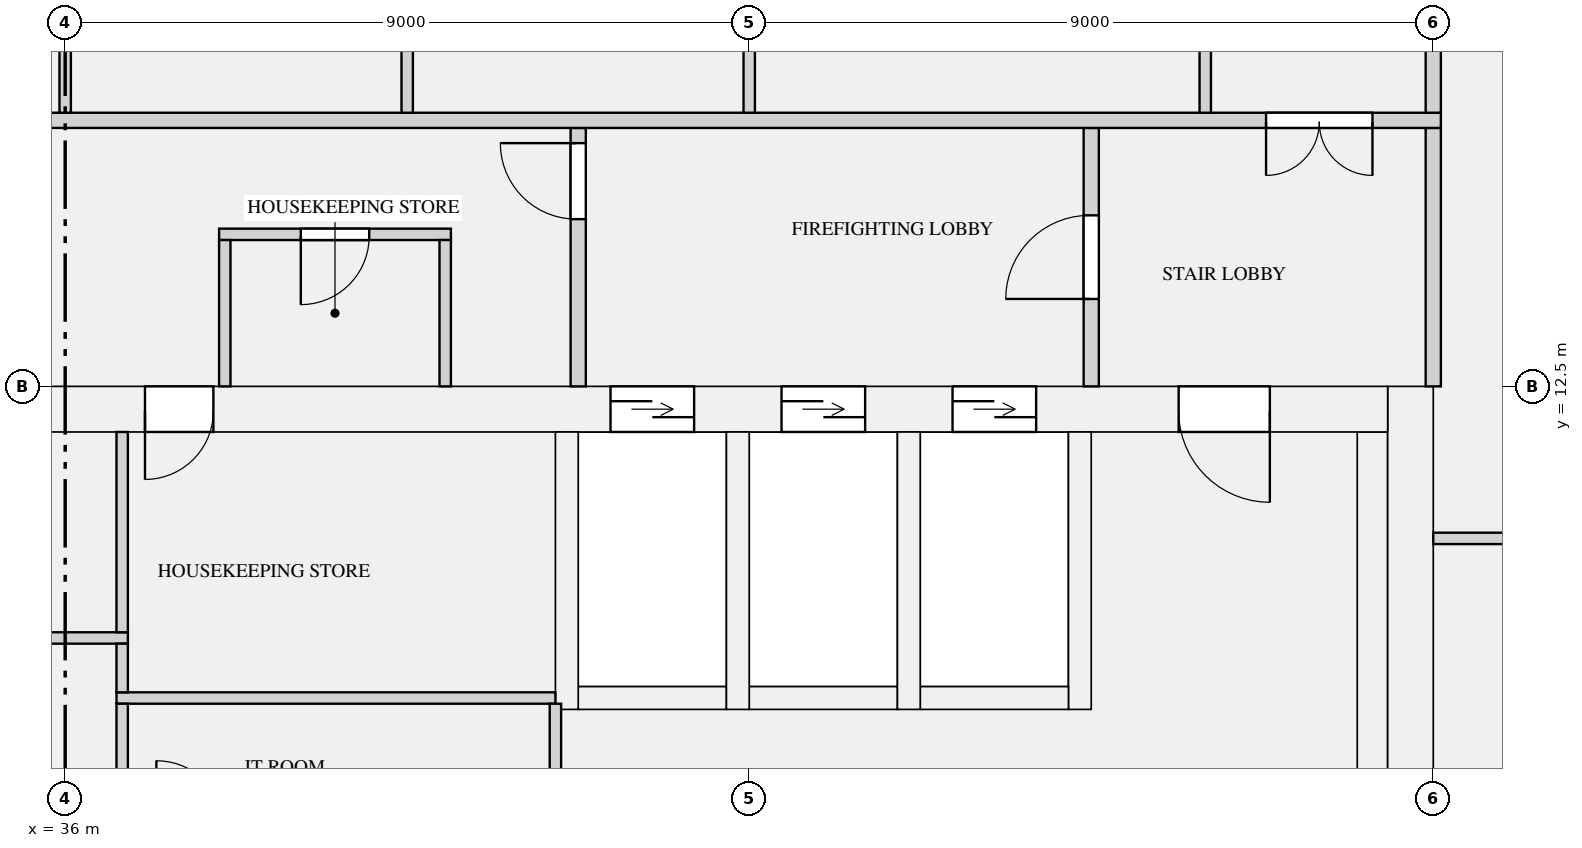
"""IFC4 building model, lengths in metres.
Left out: names, types, materials, properties, quantities, classifications, styles, units other than length and angle.
Written with IfcOpenShell. Run it as: python <this file> out.ifc"""

import sys

from ifc_helpers import new_model, si_unit, direction, frame, frame_2d, origin, place, context, subcontext, project, spatial, rectangle, extrude, element, fill, save


model = new_model("IFC4")
c1 = context("Model", 3, precision=1e-05, world=origin(), true_north=direction((0.0, 1.0)))
c2 = subcontext(c1, "Body", "Model", "MODEL_VIEW")
j1 = project(units=[si_unit("LENGTHUNIT", "METRE"), si_unit("PLANEANGLEUNIT", "RADIAN")], contexts=[c1])
p1 = place(None, origin())
s1 = spatial("IfcSite", under=j1, at=p1, CompositionType="ELEMENT")
p2 = place(p1, origin())
s2 = spatial("IfcBuilding", under=s1, at=p2, CompositionType="ELEMENT")
p3 = place(p2, frame((0.0, 0.0, 223.2)))
s3 = spatial("IfcBuildingStorey", under=s2, at=p3, CompositionType="ELEMENT", Elevation=223.2)
p4 = place(p3, frame((53.7, 0.0, 0.0), z_axis=(0.0, 0.0, 1.0), x_axis=(0.0, 1.0, 0.0)))
e1 = element("IfcWall", 1, at=p4, inside=s3, PredefinedType="SHEAR", context=c2, shape_type="SweptSolid", body=[
    extrude(rectangle(XDim=12.5, YDim=0.6, at=frame_2d((6.25, 0.0))), origin(), (0.0, 0.0, 1.0), 3.15),
])
p5 = place(p3, frame((18.6, 12.2, 0.0), z_axis=(0.0, 0.0, 1.0), x_axis=(1.0, 0.0, 0.0)))
e2 = element("IfcWall", 2, at=p5, inside=s3, PredefinedType="SHEAR", context=c2, shape_type="SweptSolid", body=[
    extrude(rectangle(XDim=34.8, YDim=0.6, at=frame_2d((17.4, 0.0))), origin(), (0.0, 0.0, 1.0), 3.15),
])
p6 = place(p5, frame((24.575, 0.0, 0.0)))
e3 = element("IfcOpeningElement", 3, at=p6, cuts=e2, PredefinedType="OPENING", context=c2, shape_type="SweptSolid", body=[
    extrude(rectangle(XDim=1.1, YDim=2.1, at=frame_2d((0.55, 1.05))), frame((0.0, 0.31, 0.0), z_axis=(0.0, -1.0, 0.0), x_axis=(1.0, 0.0, 0.0)), (0.0, 0.0, 1.0), 0.62),
])
p7 = place(p5, frame((26.825, 0.0, 0.0)))
e4 = element("IfcOpeningElement", 4, at=p7, cuts=e2, PredefinedType="OPENING", context=c2, shape_type="SweptSolid", body=[
    extrude(rectangle(XDim=1.1, YDim=2.1, at=frame_2d((0.55, 1.05))), frame((0.0, 0.31, 0.0), z_axis=(0.0, -1.0, 0.0), x_axis=(1.0, 0.0, 0.0)), (0.0, 0.0, 1.0), 0.62),
])
p8 = place(p5, frame((29.075, 0.0, 0.0)))
e5 = element("IfcOpeningElement", 5, at=p8, cuts=e2, PredefinedType="OPENING", context=c2, shape_type="SweptSolid", body=[
    extrude(rectangle(XDim=1.1, YDim=2.1, at=frame_2d((0.55, 1.05))), frame((0.0, 0.31, 0.0), z_axis=(0.0, -1.0, 0.0), x_axis=(1.0, 0.0, 0.0)), (0.0, 0.0, 1.0), 0.62),
])
p9 = place(p5, frame((11.95, 0.0, 0.0)))
e6 = element("IfcOpeningElement", 6, at=p9, cuts=e2, PredefinedType="OPENING", context=c2, shape_type="SweptSolid", body=[
    extrude(rectangle(XDim=0.9, YDim=2.1, at=frame_2d((0.45, 1.05))), frame((0.0, 0.31, 0.0), z_axis=(0.0, -1.0, 0.0), x_axis=(1.0, 0.0, 0.0)), (0.0, 0.0, 1.0), 0.62),
])
p10 = place(p5, frame((18.45, 0.0, 0.0)))
e7 = element("IfcOpeningElement", 7, at=p10, cuts=e2, PredefinedType="OPENING", context=c2, shape_type="SweptSolid", body=[
    extrude(rectangle(XDim=0.9, YDim=2.1, at=frame_2d((0.45, 1.05))), frame((0.0, 0.31, 0.0), z_axis=(0.0, -1.0, 0.0), x_axis=(1.0, 0.0, 0.0)), (0.0, 0.0, 1.0), 0.62),
])
p11 = place(p5, frame((1.55, 0.0, 0.0)))
e8 = element("IfcOpeningElement", 8, at=p11, cuts=e2, PredefinedType="OPENING", context=c2, shape_type="SweptSolid", body=[
    extrude(rectangle(XDim=1.2, YDim=2.1, at=frame_2d((0.6, 1.05))), frame((0.0, 0.31, 0.0), z_axis=(0.0, -1.0, 0.0), x_axis=(1.0, 0.0, 0.0)), (0.0, 0.0, 1.0), 0.62),
])
p12 = place(p5, frame((32.05, 0.0, 0.0)))
e9 = element("IfcOpeningElement", 9, at=p12, cuts=e2, PredefinedType="OPENING", context=c2, shape_type="SweptSolid", body=[
    extrude(rectangle(XDim=1.2, YDim=2.1, at=frame_2d((0.6, 1.05))), frame((0.0, 0.31, 0.0), z_axis=(0.0, -1.0, 0.0), x_axis=(1.0, 0.0, 0.0)), (0.0, 0.0, 1.0), 0.62),
])
p13 = place(p3, frame((53.2, 1.0, 0.0), z_axis=(0.0, 0.0, 1.0), x_axis=(0.0, 1.0, 0.0)))
e10 = element("IfcWall", 10, at=p13, inside=s3, PredefinedType="SHEAR", context=c2, shape_type="SweptSolid", body=[
    extrude(rectangle(XDim=10.9, YDim=0.4, at=frame_2d((5.45, 0.0))), origin(), (0.0, 0.0, 1.0), 3.15),
])
p14 = place(p3, frame((42.75, 8.4, 0.0), z_axis=(0.0, 0.0, 1.0), x_axis=(1.0, 0.0, 0.0)))
e11 = element("IfcWall", 11, at=p14, inside=s3, PredefinedType="SHEAR", context=c2, shape_type="SweptSolid", body=[
    extrude(rectangle(XDim=1.95, YDim=0.3, at=frame_2d((0.975, 0.0))), origin(), (0.0, 0.0, 1.0), 3.15),
])
p15 = place(p3, frame((42.6, 8.25, 0.0), z_axis=(0.0, 0.0, 1.0), x_axis=(0.0, 1.0, 0.0)))
e12 = element("IfcWall", 12, at=p15, inside=s3, PredefinedType="SHEAR", context=c2, shape_type="SweptSolid", body=[
    extrude(rectangle(XDim=3.65, YDim=0.3, at=frame_2d((1.825, 0.0))), origin(), (0.0, 0.0, 1.0), 3.15),
])
p16 = place(p3, frame((45.0, 8.4, 0.0), z_axis=(0.0, 0.0, 1.0), x_axis=(1.0, 0.0, 0.0)))
e13 = element("IfcWall", 13, at=p16, inside=s3, PredefinedType="SHEAR", context=c2, shape_type="SweptSolid", body=[
    extrude(rectangle(XDim=1.95, YDim=0.3, at=frame_2d((0.975, 0.0))), origin(), (0.0, 0.0, 1.0), 3.15),
])
p17 = place(p3, frame((44.85, 8.25, 0.0), z_axis=(0.0, 0.0, 1.0), x_axis=(0.0, 1.0, 0.0)))
e14 = element("IfcWall", 14, at=p17, inside=s3, PredefinedType="SHEAR", context=c2, shape_type="SweptSolid", body=[
    extrude(rectangle(XDim=3.65, YDim=0.3, at=frame_2d((1.825, 0.0))), origin(), (0.0, 0.0, 1.0), 3.15),
])
p18 = place(p3, frame((47.25, 8.4, 0.0), z_axis=(0.0, 0.0, 1.0), x_axis=(1.0, 0.0, 0.0)))
e15 = element("IfcWall", 15, at=p18, inside=s3, PredefinedType="SHEAR", context=c2, shape_type="SweptSolid", body=[
    extrude(rectangle(XDim=1.95, YDim=0.3, at=frame_2d((0.975, 0.0))), origin(), (0.0, 0.0, 1.0), 3.15),
])
for number, where, z_axis, x_axis in (
    (16, (47.1, 8.25, 0.0), (0.0, 0.0, 1.0), (0.0, 1.0, 0.0)),
    (17, (49.35, 8.25, 0.0), (0.0, 0.0, 1.0), (0.0, 1.0, 0.0)),
):
    element("IfcWall", number, at=place(p3, frame(where, z_axis=z_axis, x_axis=x_axis)), inside=s3, PredefinedType="SHEAR", context=c2, shape_type="SweptSolid", body=[
        extrude(rectangle(XDim=3.65, YDim=0.3, at=frame_2d((1.825, 0.0))), origin(), (0.0, 0.0, 1.0), 3.15),
    ])
p19 = place(p3, frame((36.675, 8.4, 0.0), z_axis=(0.0, 0.0, 1.0), x_axis=(1.0, 0.0, 0.0)))
e18 = element("IfcWall", 18, at=p19, inside=s3, PredefinedType="PARTITIONING", context=c2, shape_type="SweptSolid", body=[
    extrude(rectangle(XDim=5.775, YDim=0.15, at=frame_2d((2.887, 0.0))), origin(), (0.0, 0.0, 1.0), 2.83),
])
p20 = place(p3, frame((28.275, 9.19, 0.0), z_axis=(0.0, 0.0, 1.0), x_axis=(1.0, 0.0, 0.0)))
e19 = element("IfcWall", 19, at=p20, inside=s3, PredefinedType="PARTITIONING", context=c2, shape_type="SweptSolid", body=[
    extrude(rectangle(XDim=8.55, YDim=0.15, at=frame_2d((4.275, 0.0))), origin(), (0.0, 0.0, 1.0), 2.83),
])
p21 = place(p3, frame((38.025, 14.5, 0.0), z_axis=(0.0, 0.0, 1.0), x_axis=(1.0, 0.0, 0.0)))
e20 = element("IfcWall", 20, at=p21, inside=s3, PredefinedType="PARTITIONING", context=c2, shape_type="SweptSolid", body=[
    extrude(rectangle(XDim=3.05, YDim=0.15, at=frame_2d((1.525, 0.0))), origin(), (0.0, 0.0, 1.0), 2.83),
])
p22 = place(p21, frame((1.075, 0.0, 0.0)))
e21 = element("IfcOpeningElement", 21, at=p22, cuts=e20, PredefinedType="OPENING", context=c2, shape_type="SweptSolid", body=[
    extrude(rectangle(XDim=0.9, YDim=2.1, at=frame_2d((0.45, 1.05))), frame((0.0, 0.085, 0.0), z_axis=(0.0, -1.0, 0.0), x_axis=(1.0, 0.0, 0.0)), (0.0, 0.0, 1.0), 0.17),
])
p23 = place(p3, frame((42.45, 6.65, 0.0), z_axis=(0.0, 0.0, 1.0), x_axis=(0.0, 1.0, 0.0)))
e22 = element("IfcWall", 22, at=p23, inside=s3, PredefinedType="PARTITIONING", context=c2, shape_type="SweptSolid", body=[
    extrude(rectangle(XDim=1.675, YDim=0.15, at=frame_2d((0.837, 0.0))), origin(), (0.0, 0.0, 1.0), 2.83),
])
p24 = place(p3, frame((36.75, 6.725, 0.0), z_axis=(0.0, 0.0, 1.0), x_axis=(0.0, 1.0, 0.0)))
e23 = element("IfcWall", 23, at=p24, inside=s3, PredefinedType="PARTITIONING", context=c2, shape_type="SweptSolid", body=[
    extrude(rectangle(XDim=1.6, YDim=0.15, at=frame_2d((0.8, 0.0))), origin(), (0.0, 0.0, 1.0), 2.83),
])
p25 = place(p3, frame((36.75, 8.475, 0.0), z_axis=(0.0, 0.0, 1.0), x_axis=(0.0, 1.0, 0.0)))
e24 = element("IfcWall", 24, at=p25, inside=s3, PredefinedType="PARTITIONING", context=c2, shape_type="SweptSolid", body=[
    extrude(rectangle(XDim=0.64, YDim=0.15, at=frame_2d((0.32, 0.0))), origin(), (0.0, 0.0, 1.0), 2.83),
])
p26 = place(p3, frame((36.75, 9.265, 0.0), z_axis=(0.0, 0.0, 1.0), x_axis=(0.0, 1.0, 0.0)))
e25 = element("IfcWall", 25, at=p26, inside=s3, PredefinedType="PARTITIONING", context=c2, shape_type="SweptSolid", body=[
    extrude(rectangle(XDim=2.635, YDim=0.15, at=frame_2d((1.317, 0.0))), origin(), (0.0, 0.0, 1.0), 2.83),
])
for number, where, z_axis, x_axis in (
    (26, (38.1, 12.5, 0.0), (0.0, 0.0, 1.0), (0.0, 1.0, 0.0)),
    (27, (41.0, 12.5, 0.0), (0.0, 0.0, 1.0), (0.0, 1.0, 0.0)),
):
    element("IfcWall", number, at=place(p3, frame(where, z_axis=z_axis, x_axis=x_axis)), inside=s3, PredefinedType="PARTITIONING", context=c2, shape_type="SweptSolid", body=[
        extrude(rectangle(XDim=1.925, YDim=0.15, at=frame_2d((0.962, 0.0))), origin(), (0.0, 0.0, 1.0), 2.83),
    ])
p27 = place(p3, frame((42.75, 12.5, 0.0), z_axis=(0.0, 0.0, 1.0), x_axis=(0.0, 1.0, 0.0)))
e28 = element("IfcWall", 28, at=p27, inside=s3, PredefinedType="PARTITIONING", context=c2, shape_type="SweptSolid", body=[
    extrude(rectangle(XDim=3.4, YDim=0.2, at=frame_2d((1.7, 0.0))), origin(), (0.0, 0.0, 1.0), 2.83),
])
p28 = place(p27, frame((2.2, 0.0, 0.0)))
e29 = element("IfcOpeningElement", 29, at=p28, cuts=e28, PredefinedType="OPENING", context=c2, shape_type="SweptSolid", body=[
    extrude(rectangle(XDim=1.0, YDim=2.1, at=frame_2d((0.5, 1.05))), frame((0.0, 0.11, 0.0), z_axis=(0.0, -1.0, 0.0), x_axis=(1.0, 0.0, 0.0)), (0.0, 0.0, 1.0), 0.22),
])
p29 = place(p3, frame((49.5, 12.5, 0.0), z_axis=(0.0, 0.0, 1.0), x_axis=(0.0, 1.0, 0.0)))
e30 = element("IfcWall", 30, at=p29, inside=s3, PredefinedType="PARTITIONING", context=c2, shape_type="SweptSolid", body=[
    extrude(rectangle(XDim=3.4, YDim=0.2, at=frame_2d((1.7, 0.0))), origin(), (0.0, 0.0, 1.0), 2.83),
])
p30 = place(p29, frame((1.15, 0.0, 0.0)))
e31 = element("IfcOpeningElement", 31, at=p30, cuts=e30, PredefinedType="OPENING", context=c2, shape_type="SweptSolid", body=[
    extrude(rectangle(XDim=1.1, YDim=2.1, at=frame_2d((0.55, 1.05))), frame((0.0, 0.11, 0.0), z_axis=(0.0, -1.0, 0.0), x_axis=(1.0, 0.0, 0.0)), (0.0, 0.0, 1.0), 0.22),
])
p31 = place(p3, frame((54.0, 12.5, 0.0), z_axis=(0.0, 0.0, 1.0), x_axis=(0.0, 1.0, 0.0)))
e32 = element("IfcWall", 32, at=p31, inside=s3, PredefinedType="PARTITIONING", context=c2, shape_type="SweptSolid", body=[
    extrude(rectangle(XDim=3.4, YDim=0.2, at=frame_2d((1.7, 0.0))), origin(), (0.0, 0.0, 1.0), 2.83),
])
p32 = place(p3, frame((54.0, 10.5, 0.0), z_axis=(0.0, 0.0, 1.0), x_axis=(1.0, 0.0, 0.0)))
e33 = element("IfcWall", 33, at=p32, inside=s3, PredefinedType="PARTITIONING", context=c2, shape_type="SweptSolid", body=[
    extrude(rectangle(XDim=8.925, YDim=0.15, at=frame_2d((4.462, 0.0))), origin(), (0.0, 0.0, 1.0), 2.83),
])
p33 = place(p32, frame((1.5, 0.0, 0.0)))
e34 = element("IfcOpeningElement", 34, at=p33, cuts=e33, PredefinedType="OPENING", context=c2, shape_type="SweptSolid", body=[
    extrude(rectangle(XDim=1.5, YDim=2.1, at=frame_2d((0.75, 1.05))), frame((0.0, 0.085, 0.0), z_axis=(0.0, -1.0, 0.0), x_axis=(1.0, 0.0, 0.0)), (0.0, 0.0, 1.0), 0.17),
])
p34 = place(p3, frame((17.9, 16.0, 0.0), z_axis=(0.0, 0.0, 1.0), x_axis=(1.0, 0.0, 0.0)))
e35 = element("IfcWall", 35, at=p34, inside=s3, PredefinedType="PARTITIONING", context=c2, shape_type="SweptSolid", body=[
    extrude(rectangle(XDim=36.2, YDim=0.2, at=frame_2d((18.1, 0.0))), origin(), (0.0, 0.0, 1.0), 2.83),
])
p35 = place(p34, frame((0.9, 0.0, 0.0)))
e36 = element("IfcOpeningElement", 36, at=p35, cuts=e35, PredefinedType="OPENING", context=c2, shape_type="SweptSolid", body=[
    extrude(rectangle(XDim=1.4, YDim=2.1, at=frame_2d((0.7, 1.05))), frame((0.0, 0.11, 0.0), z_axis=(0.0, -1.0, 0.0), x_axis=(1.0, 0.0, 0.0)), (0.0, 0.0, 1.0), 0.22),
])
p36 = place(p34, frame((33.9, 0.0, 0.0)))
e37 = element("IfcOpeningElement", 37, at=p36, cuts=e35, PredefinedType="OPENING", context=c2, shape_type="SweptSolid", body=[
    extrude(rectangle(XDim=1.4, YDim=2.1, at=frame_2d((0.7, 1.05))), frame((0.0, 0.11, 0.0), z_axis=(0.0, -1.0, 0.0), x_axis=(1.0, 0.0, 0.0)), (0.0, 0.0, 1.0), 0.22),
])
p37 = place(p3, frame((54.0, 16.1, 0.0), z_axis=(0.0, 0.0, 1.0), x_axis=(0.0, 1.0, 0.0)))
e38 = element("IfcWall", 38, at=p37, inside=s3, PredefinedType="PARTITIONING", context=c2, shape_type="SweptSolid", body=[
    extrude(rectangle(XDim=7.8, YDim=0.2, at=frame_2d((3.9, 0.0))), origin(), (0.0, 0.0, 1.0), 2.83),
])
p38 = place(p37, frame((1.85, 0.0, 0.0)))
e39 = element("IfcOpeningElement", 39, at=p38, cuts=e38, PredefinedType="OPENING", context=c2, shape_type="SweptSolid", body=[
    extrude(rectangle(XDim=1.1, YDim=2.1, at=frame_2d((0.55, 1.05))), frame((0.0, 0.11, 0.0), z_axis=(0.0, -1.0, 0.0), x_axis=(1.0, 0.0, 0.0)), (0.0, 0.0, 1.0), 0.22),
])
for number, where, z_axis, x_axis in (
    (40, (51.0, 16.1, 0.0), (0.0, 0.0, 1.0), (0.0, 1.0, 0.0)),
    (41, (45.0, 16.1, 0.0), (0.0, 0.0, 1.0), (0.0, 1.0, 0.0)),
    (42, (36.0, 16.1, 0.0), (0.0, 0.0, 1.0), (0.0, 1.0, 0.0)),
    (43, (40.5, 16.1, 0.0), (0.0, 0.0, 1.0), (0.0, 1.0, 0.0)),
):
    element("IfcWall", number, at=place(p3, frame(where, z_axis=z_axis, x_axis=x_axis)), inside=s3, PredefinedType="PARTITIONING", context=c2, shape_type="SweptSolid", body=[
        extrude(rectangle(XDim=4.825, YDim=0.15, at=frame_2d((2.413, 0.0))), origin(), (0.0, 0.0, 1.0), 2.83),
    ])
p39 = place(p6, origin())
e44 = element("IfcDoor", 44, at=p39, inside=s3, OperationType="DOUBLE_DOOR_SLIDING", PredefinedType="DOOR", context=c2, shape_type="SweptSolid", body=[
    extrude(rectangle(XDim=1.1, YDim=2.1, at=frame_2d((0.55, 1.05))), frame((0.0, 0.025, 0.0), z_axis=(0.0, -1.0, 0.0), x_axis=(1.0, 0.0, 0.0)), (0.0, 0.0, 1.0), 0.05),
])
fill(e3, e44)
p40 = place(p7, origin())
e45 = element("IfcDoor", 45, at=p40, inside=s3, OperationType="DOUBLE_DOOR_SLIDING", PredefinedType="DOOR", context=c2, shape_type="SweptSolid", body=[
    extrude(rectangle(XDim=1.1, YDim=2.1, at=frame_2d((0.55, 1.05))), frame((0.0, 0.025, 0.0), z_axis=(0.0, -1.0, 0.0), x_axis=(1.0, 0.0, 0.0)), (0.0, 0.0, 1.0), 0.05),
])
fill(e4, e45)
p41 = place(p8, origin())
e46 = element("IfcDoor", 46, at=p41, inside=s3, OperationType="DOUBLE_DOOR_SLIDING", PredefinedType="DOOR", context=c2, shape_type="SweptSolid", body=[
    extrude(rectangle(XDim=1.1, YDim=2.1, at=frame_2d((0.55, 1.05))), frame((0.0, 0.025, 0.0), z_axis=(0.0, -1.0, 0.0), x_axis=(1.0, 0.0, 0.0)), (0.0, 0.0, 1.0), 0.05),
])
fill(e5, e46)
p42 = place(p22, frame((0.9, 0.0, 0.0), z_axis=(0.0, 0.0, 1.0), x_axis=(-1.0, 0.0, 0.0)))
e47 = element("IfcDoor", 47, at=p42, inside=s3, OperationType="SINGLE_SWING_RIGHT", PredefinedType="DOOR", context=c2, shape_type="SweptSolid", body=[
    extrude(rectangle(XDim=0.9, YDim=2.1, at=frame_2d((0.45, 1.05))), frame((0.0, 0.025, 0.0), z_axis=(0.0, -1.0, 0.0), x_axis=(1.0, 0.0, 0.0)), (0.0, 0.0, 1.0), 0.05),
])
fill(e21, e47)
p43 = place(p10, frame((0.9, 0.0, 0.0), z_axis=(0.0, 0.0, 1.0), x_axis=(-1.0, 0.0, 0.0)))
e48 = element("IfcDoor", 48, at=p43, inside=s3, OperationType="SINGLE_SWING_RIGHT", PredefinedType="DOOR", context=c2, shape_type="SweptSolid", body=[
    extrude(rectangle(XDim=0.9, YDim=2.1, at=frame_2d((0.45, 1.05))), frame((0.0, 0.025, 0.0), z_axis=(0.0, -1.0, 0.0), x_axis=(1.0, 0.0, 0.0)), (0.0, 0.0, 1.0), 0.05),
])
fill(e7, e48)
p44 = place(p12, frame((1.2, 0.0, 0.0), z_axis=(0.0, 0.0, 1.0), x_axis=(-1.0, 0.0, 0.0)))
e49 = element("IfcDoor", 49, at=p44, inside=s3, OperationType="SINGLE_SWING_LEFT", PredefinedType="DOOR", context=c2, shape_type="SweptSolid", body=[
    extrude(rectangle(XDim=1.2, YDim=2.1, at=frame_2d((0.6, 1.05))), frame((0.0, 0.025, 0.0), z_axis=(0.0, -1.0, 0.0), x_axis=(1.0, 0.0, 0.0)), (0.0, 0.0, 1.0), 0.05),
])
fill(e9, e49)
p45 = place(p28, origin())
e50 = element("IfcDoor", 50, at=p45, inside=s3, OperationType="SINGLE_SWING_RIGHT", PredefinedType="DOOR", context=c2, shape_type="SweptSolid", body=[
    extrude(rectangle(XDim=1.0, YDim=2.1, at=frame_2d((0.5, 1.05))), frame((0.0, 0.025, 0.0), z_axis=(0.0, -1.0, 0.0), x_axis=(1.0, 0.0, 0.0)), (0.0, 0.0, 1.0), 0.05),
])
fill(e29, e50)
p46 = place(p30, origin())
e51 = element("IfcDoor", 51, at=p46, inside=s3, OperationType="SINGLE_SWING_LEFT", PredefinedType="DOOR", context=c2, shape_type="SweptSolid", body=[
    extrude(rectangle(XDim=1.1, YDim=2.1, at=frame_2d((0.55, 1.05))), frame((0.0, 0.025, 0.0), z_axis=(0.0, -1.0, 0.0), x_axis=(1.0, 0.0, 0.0)), (0.0, 0.0, 1.0), 0.05),
])
fill(e31, e51)
p47 = place(p36, frame((1.4, 0.0, 0.0), z_axis=(0.0, 0.0, 1.0), x_axis=(-1.0, 0.0, 0.0)))
e52 = element("IfcDoor", 52, at=p47, inside=s3, OperationType="DOUBLE_DOOR_SINGLE_SWING", PredefinedType="DOOR", context=c2, shape_type="SweptSolid", body=[
    extrude(rectangle(XDim=1.4, YDim=2.1, at=frame_2d((0.7, 1.05))), frame((0.0, 0.025, 0.0), z_axis=(0.0, -1.0, 0.0), x_axis=(1.0, 0.0, 0.0)), (0.0, 0.0, 1.0), 0.05),
])
fill(e37, e52)
save(model, sys.argv[1])
